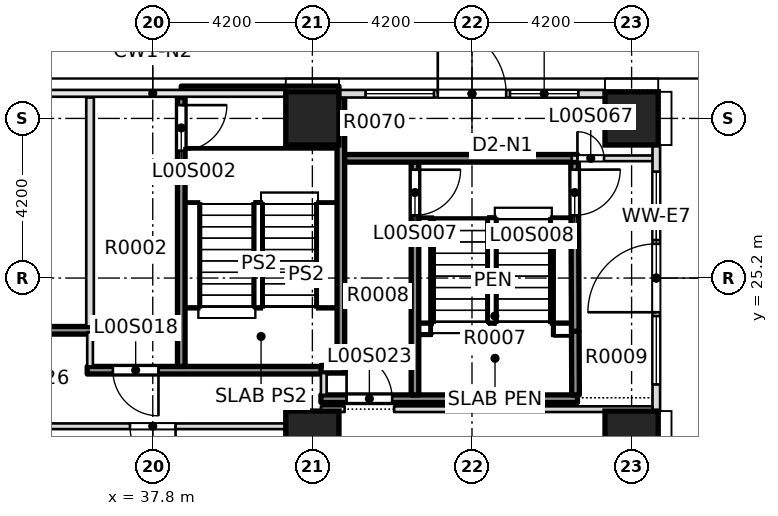
"""IFC4 building model, lengths in metres.
Left out: names, types, materials, properties, quantities, classifications, styles, units other than length and angle.
Written with IfcOpenShell. Run it as: python <this file> out.ifc"""

import sys

from ifc_helpers import new_model, si_unit, direction, frame, frame_2d, origin, origin_2d, place, context, subcontext, project, spatial, rectangle, extrude, element, fill, save


model = new_model("IFC4")
c1 = context("Model", 3, precision=1e-05, world=origin(), true_north=direction((0.0, 1.0)))
c2 = subcontext(c1, "Body", "Model", "MODEL_VIEW")
j1 = project(units=[si_unit("LENGTHUNIT", "METRE"), si_unit("PLANEANGLEUNIT", "RADIAN")], contexts=[c1])
p1 = place(None, origin())
s1 = spatial("IfcSite", under=j1, at=p1, CompositionType="ELEMENT")
p2 = place(p1, origin())
s2 = spatial("IfcBuilding", under=s1, at=p2, CompositionType="ELEMENT")
p3 = place(p2, origin())
s3 = spatial("IfcBuildingStorey", under=s2, at=p3, CompositionType="ELEMENT", Elevation=0.0)
for number, where, z_axis, x_axis in (
    (1, (42.0, 21.0, 0.0), (0.0, 0.0, 1.0), (1.0, 0.0, 0.0)),
    (2, (50.4, 21.0, 0.0), (0.0, 0.0, 1.0), (1.0, 0.0, 0.0)),
    (3, (42.0, 29.4, 0.0), (0.0, 0.0, 1.0), (1.0, 0.0, 0.0)),
    (4, (50.4, 29.4, 0.0), (0.0, 0.0, 1.0), (1.0, 0.0, 0.0)),
):
    element("IfcColumn", number, at=place(p3, frame(where, z_axis=z_axis, x_axis=x_axis)), inside=s3, PredefinedType="COLUMN", context=c2, shape_type="SweptSolid", body=[
        extrude(rectangle(XDim=1.4, YDim=1.4, at=origin_2d()), origin(), (0.0, 0.0, 1.0), 7.5),
    ])
p4 = place(p3, frame((33.525, 21.3, 0.0), z_axis=(0.0, 0.0, 1.0), x_axis=(1.0, 0.0, 0.0)))
e5 = element("IfcWall", 5, at=p4, inside=s3, PredefinedType="PARTITIONING", context=c2, shape_type="SweptSolid", body=[
    extrude(rectangle(XDim=8.85, YDim=0.15, at=frame_2d((4.425, 0.0))), origin(), (0.0, 0.0, 1.0), 7.1),
])
p5 = place(p4, frame((3.675, 0.0, 0.0)))
e6 = element("IfcOpeningElement", 6, at=p5, cuts=e5, PredefinedType="OPENING", context=c2, shape_type="SweptSolid", body=[
    extrude(rectangle(XDim=1.2, YDim=2.1, at=frame_2d((0.6, 1.05))), frame((0.0, 0.085, 0.0), z_axis=(0.0, -1.0, 0.0), x_axis=(1.0, 0.0, 0.0)), (0.0, 0.0, 1.0), 0.17),
])
p6 = place(p3, frame((42.225, 21.75, 0.0), z_axis=(0.0, 0.0, 1.0), x_axis=(1.0, 0.0, 0.0)))
e7 = element("IfcWall", 7, at=p6, inside=s3, PredefinedType="PARTITIONING", context=c2, shape_type="SweptSolid", body=[
    extrude(rectangle(XDim=0.625, YDim=0.15, at=frame_2d((0.312, 0.0))), origin(), (0.0, 0.0, 1.0), 7.1),
])
p7 = place(p3, frame((42.225, 22.025, 0.0), z_axis=(0.0, 0.0, 1.0), x_axis=(1.0, 0.0, 0.0)))
e8 = element("IfcWall", 8, at=p7, inside=s3, PredefinedType="SOLIDWALL", context=c2, shape_type="SweptSolid", body=[
    extrude(rectangle(XDim=6.75, YDim=0.2, at=frame_2d((3.375, 0.0))), origin(), (0.0, 0.0, 1.0), 7.1),
])
p8 = place(p7, frame((0.675, 0.0, 0.0)))
e9 = element("IfcOpeningElement", 9, at=p8, cuts=e8, PredefinedType="OPENING", context=c2, shape_type="SweptSolid", body=[
    extrude(rectangle(XDim=1.2, YDim=2.1, at=frame_2d((0.6, 1.05))), frame((0.0, 0.11, 0.0), z_axis=(0.0, -1.0, 0.0), x_axis=(1.0, 0.0, 0.0)), (0.0, 0.0, 1.0), 0.22),
])
p9 = place(p3, frame((36.075, 22.775, 0.0), z_axis=(0.0, 0.0, 1.0), x_axis=(1.0, 0.0, 0.0)))
e10 = element("IfcWall", 10, at=p9, inside=s3, PredefinedType="SOLIDWALL", context=c2, shape_type="SweptSolid", body=[
    extrude(rectangle(XDim=6.3, YDim=0.2, at=frame_2d((3.15, 0.0))), origin(), (0.0, 0.0, 1.0), 7.1),
])
p10 = place(p9, frame((0.675, 0.0, 0.0)))
e11 = element("IfcOpeningElement", 11, at=p10, cuts=e10, PredefinedType="OPENING", context=c2, shape_type="SweptSolid", body=[
    extrude(rectangle(XDim=1.2, YDim=2.1, at=frame_2d((0.6, 1.05))), frame((0.0, 0.11, 0.0), z_axis=(0.0, -1.0, 0.0), x_axis=(1.0, 0.0, 0.0)), (0.0, 0.0, 1.0), 0.22),
])
p11 = place(p3, frame((42.225, 22.8, 0.0), z_axis=(0.0, 0.0, 1.0), x_axis=(1.0, 0.0, 0.0)))
e12 = element("IfcWall", 12, at=p11, inside=s3, PredefinedType="SOLIDWALL", context=c2, shape_type="SweptSolid", body=[
    extrude(rectangle(XDim=0.625, YDim=0.2, at=frame_2d((0.312, 0.0))), origin(), (0.0, 0.0, 1.0), 7.1),
])
p12 = place(p3, frame((-15.2, 23.825, 0.0), z_axis=(0.0, 0.0, 1.0), x_axis=(1.0, 0.0, 0.0)))
e13 = element("IfcWall", 13, at=p12, inside=s3, PredefinedType="SOLIDWALL", context=c2, shape_type="SweptSolid", body=[
    extrude(rectangle(XDim=51.45, YDim=0.2, at=frame_2d((25.725, 0.0))), origin(), (0.0, 0.0, 1.0), 7.1),
])
p13 = place(p12, frame((17.9, 0.0, 0.0)))
e14 = element("IfcOpeningElement", 14, at=p13, cuts=e13, PredefinedType="OPENING", context=c2, shape_type="SweptSolid", body=[
    extrude(rectangle(XDim=1.2, YDim=2.1, at=frame_2d((0.6, 1.05))), frame((0.0, 0.11, 0.0), z_axis=(0.0, -1.0, 0.0), x_axis=(1.0, 0.0, 0.0)), (0.0, 0.0, 1.0), 0.22),
])
p14 = place(p12, frame((1.7, 0.0, 0.0)))
e15 = element("IfcOpeningElement", 15, at=p14, cuts=e13, PredefinedType="OPENING", context=c2, shape_type="SweptSolid", body=[
    extrude(rectangle(XDim=0.9, YDim=2.1, at=frame_2d((0.45, 1.05))), frame((0.0, 0.11, 0.0), z_axis=(0.0, -1.0, 0.0), x_axis=(1.0, 0.0, 0.0)), (0.0, 0.0, 1.0), 0.22),
])
p15 = place(p12, frame((7.925, 0.0, 0.0)))
e16 = element("IfcOpeningElement", 16, at=p15, cuts=e13, PredefinedType="OPENING", context=c2, shape_type="SweptSolid", body=[
    extrude(rectangle(XDim=1.5, YDim=2.1, at=frame_2d((0.75, 1.05))), frame((0.0, 0.11, 0.0), z_axis=(0.0, -1.0, 0.0), x_axis=(1.0, 0.0, 0.0)), (0.0, 0.0, 1.0), 0.22),
])
p16 = place(p12, frame((24.05, 0.0, 0.0)))
e17 = element("IfcOpeningElement", 17, at=p16, cuts=e13, PredefinedType="OPENING", context=c2, shape_type="SweptSolid", body=[
    extrude(rectangle(XDim=0.9, YDim=2.1, at=frame_2d((0.45, 1.05))), frame((0.0, 0.11, 0.0), z_axis=(0.0, -1.0, 0.0), x_axis=(1.0, 0.0, 0.0)), (0.0, 0.0, 1.0), 0.22),
])
p17 = place(p12, frame((33.05, 0.0, 0.0)))
e18 = element("IfcOpeningElement", 18, at=p17, cuts=e13, PredefinedType="OPENING", context=c2, shape_type="SweptSolid", body=[
    extrude(rectangle(XDim=0.9, YDim=2.1, at=frame_2d((0.45, 1.05))), frame((0.0, 0.11, 0.0), z_axis=(0.0, -1.0, 0.0), x_axis=(1.0, 0.0, 0.0)), (0.0, 0.0, 1.0), 0.22),
])
p18 = place(p12, frame((44.075, 0.0, 0.0)))
e19 = element("IfcOpeningElement", 19, at=p18, cuts=e13, PredefinedType="OPENING", context=c2, shape_type="SweptSolid", body=[
    extrude(rectangle(XDim=0.9, YDim=2.1, at=frame_2d((0.45, 1.05))), frame((0.0, 0.11, 0.0), z_axis=(0.0, -1.0, 0.0), x_axis=(1.0, 0.0, 0.0)), (0.0, 0.0, 1.0), 0.22),
])
p19 = place(p3, frame((48.825, 28.35, 0.0), z_axis=(0.0, 0.0, 1.0), x_axis=(1.0, 0.0, 0.0)))
e20 = element("IfcWall", 20, at=p19, inside=s3, PredefinedType="PARTITIONING", context=c2, shape_type="SweptSolid", body=[
    extrude(rectangle(XDim=2.225, YDim=0.15, at=frame_2d((1.113, 0.0))), origin(), (0.0, 0.0, 1.0), 7.1),
])
p20 = place(p19, frame((0.15, 0.0, 0.0)))
e21 = element("IfcOpeningElement", 21, at=p20, cuts=e20, PredefinedType="OPENING", context=c2, shape_type="SweptSolid", body=[
    extrude(rectangle(XDim=0.7, YDim=2.1, at=frame_2d((0.35, 1.05))), frame((0.0, 0.085, 0.0), z_axis=(0.0, -1.0, 0.0), x_axis=(1.0, 0.0, 0.0)), (0.0, 0.0, 1.0), 0.17),
])
p21 = place(p3, frame((36.15, 22.875, 0.0), z_axis=(0.0, 0.0, 1.0), x_axis=(0.0, 1.0, 0.0)))
e22 = element("IfcWall", 22, at=p21, inside=s3, PredefinedType="PARTITIONING", context=c2, shape_type="SweptSolid", body=[
    extrude(rectangle(XDim=0.9, YDim=0.15, at=frame_2d((0.45, 0.0))), origin(), (0.0, 0.0, 1.0), 7.1),
])
p22 = place(p3, frame((36.15, 23.925, 0.0), z_axis=(0.0, 0.0, 1.0), x_axis=(0.0, 1.0, 0.0)))
e23 = element("IfcWall", 23, at=p22, inside=s3, PredefinedType="PARTITIONING", context=c2, shape_type="SweptSolid", body=[
    extrude(rectangle(XDim=6.025, YDim=0.2, at=frame_2d((3.012, 0.0))), origin(), (0.0, 0.0, 1.0), 7.1),
])
p23 = place(p3, frame((38.55, 22.875, 0.0), z_axis=(0.0, 0.0, 1.0), x_axis=(0.0, 1.0, 0.0)))
e24 = element("IfcWall", 24, at=p23, inside=s3, PredefinedType="SOLIDWALL", context=c2, shape_type="SweptSolid", body=[
    extrude(rectangle(XDim=7.075, YDim=0.2, at=frame_2d((3.538, 0.0))), origin(), (0.0, 0.0, 1.0), 7.1),
])
p24 = place(p23, frame((5.675, 0.0, 0.0)))
e25 = element("IfcOpeningElement", 25, at=p24, cuts=e24, PredefinedType="OPENING", context=c2, shape_type="SweptSolid", body=[
    extrude(rectangle(XDim=1.2, YDim=2.1, at=frame_2d((0.6, 1.05))), frame((0.0, 0.11, 0.0), z_axis=(0.0, -1.0, 0.0), x_axis=(1.0, 0.0, 0.0)), (0.0, 0.0, 1.0), 0.22),
])
p25 = place(p3, frame((42.0, 12.7, 0.0), z_axis=(0.0, 0.0, 1.0), x_axis=(0.0, 1.0, 0.0)))
e26 = element("IfcWall", 26, at=p25, inside=s3, PredefinedType="PARTITIONING", context=c2, shape_type="SweptSolid", body=[
    extrude(rectangle(XDim=8.525, YDim=0.2, at=frame_2d((4.263, 0.0))), origin(), (0.0, 0.0, 1.0), 7.1),
])
p26 = place(p25, frame((3.812, 0.0, 0.0)))
e27 = element("IfcOpeningElement", 27, at=p26, cuts=e26, PredefinedType="OPENING", context=c2, shape_type="SweptSolid", body=[
    extrude(rectangle(XDim=0.9, YDim=2.1, at=frame_2d((0.45, 1.05))), frame((0.0, 0.11, 0.0), z_axis=(0.0, -1.0, 0.0), x_axis=(1.0, 0.0, 0.0)), (0.0, 0.0, 1.0), 0.22),
])
p27 = place(p3, frame((42.3, 21.375, 0.0), z_axis=(0.0, 0.0, 1.0), x_axis=(0.0, 1.0, 0.0)))
e28 = element("IfcWall", 28, at=p27, inside=s3, PredefinedType="PARTITIONING", context=c2, shape_type="SweptSolid", body=[
    extrude(rectangle(XDim=0.3, YDim=0.15, at=frame_2d((0.15, 0.0))), origin(), (0.0, 0.0, 1.0), 7.1),
])
p28 = place(p3, frame((42.3, 22.125, 0.0), z_axis=(0.0, 0.0, 1.0), x_axis=(0.0, 1.0, 0.0)))
e29 = element("IfcWall", 29, at=p28, inside=s3, PredefinedType="PARTITIONING", context=c2, shape_type="SweptSolid", body=[
    extrude(rectangle(XDim=0.575, YDim=0.15, at=frame_2d((0.288, 0.0))), origin(), (0.0, 0.0, 1.0), 7.1),
])
p29 = place(p3, frame((42.75, 22.9, 0.0), z_axis=(0.0, 0.0, 1.0), x_axis=(0.0, 1.0, 0.0)))
e30 = element("IfcWall", 30, at=p29, inside=s3, PredefinedType="SOLIDWALL", context=c2, shape_type="SweptSolid", body=[
    extrude(rectangle(XDim=7.05, YDim=0.2, at=frame_2d((3.525, 0.0))), origin(), (0.0, 0.0, 1.0), 7.1),
])
p30 = place(p3, frame((44.7, 22.125, 0.0), z_axis=(0.0, 0.0, 1.0), x_axis=(0.0, 1.0, 0.0)))
e31 = element("IfcWall", 31, at=p30, inside=s3, PredefinedType="SOLIDWALL", context=c2, shape_type="SweptSolid", body=[
    extrude(rectangle(XDim=6.125, YDim=0.2, at=frame_2d((3.062, 0.0))), origin(), (0.0, 0.0, 1.0), 7.1),
])
p31 = place(p30, frame((4.725, 0.0, 0.0)))
e32 = element("IfcOpeningElement", 32, at=p31, cuts=e31, PredefinedType="OPENING", context=c2, shape_type="SweptSolid", body=[
    extrude(rectangle(XDim=1.2, YDim=2.1, at=frame_2d((0.6, 1.05))), frame((0.0, 0.11, 0.0), z_axis=(0.0, -1.0, 0.0), x_axis=(1.0, 0.0, 0.0)), (0.0, 0.0, 1.0), 0.22),
])
p32 = place(p3, frame((48.925, 22.125, 0.0), z_axis=(0.0, 0.0, 1.0), x_axis=(-0.003935829573, 0.999992254593, 0.0)))
e33 = element("IfcWall", 33, at=p32, inside=s3, PredefinedType="SOLIDWALL", context=c2, shape_type="SweptSolid", body=[
    extrude(rectangle(XDim=1.675, YDim=0.2, at=frame_2d((0.837, 0.0))), origin(), (0.0, 0.0, 1.0), 7.1),
])
p33 = place(p3, frame((51.05, 28.7, 0.0), z_axis=(0.0, 0.0, 1.0), x_axis=(0.0, -1.0, 0.0)))
e34 = element("IfcWall", 34, at=p33, inside=s3, PredefinedType="STANDARD", context=c2, shape_type="SweptSolid", body=[
    extrude(rectangle(XDim=7.0, YDim=0.2, at=frame_2d((3.5, 0.0))), origin(), (0.0, 0.0, 1.0), 7.1),
])
p34 = place(p33, frame((4.5, 0.0, 0.3)))
e35 = element("IfcOpeningElement", 35, at=p34, cuts=e34, PredefinedType="OPENING", context=c2, shape_type="SweptSolid", body=[
    extrude(rectangle(XDim=1.8, YDim=4.2, at=frame_2d((0.9, 2.1))), frame((0.0, 0.11, 0.0), z_axis=(0.0, -1.0, 0.0), x_axis=(1.0, 0.0, 0.0)), (0.0, 0.0, 1.0), 0.22),
])
p35 = place(p33, frame((2.6, 0.0, 0.0)))
e36 = element("IfcOpeningElement", 36, at=p35, cuts=e34, PredefinedType="OPENING", context=c2, shape_type="SweptSolid", body=[
    extrude(rectangle(XDim=1.8, YDim=2.4, at=frame_2d((0.9, 1.2))), frame((0.0, 0.11, 0.0), z_axis=(0.0, -1.0, 0.0), x_axis=(1.0, 0.0, 0.0)), (0.0, 0.0, 1.0), 0.22),
])
p36 = place(p33, frame((0.7, 0.0, 0.3)))
e37 = element("IfcOpeningElement", 37, at=p36, cuts=e34, PredefinedType="OPENING", context=c2, shape_type="SweptSolid", body=[
    extrude(rectangle(XDim=1.8, YDim=4.2, at=frame_2d((0.9, 2.1))), frame((0.0, 0.11, 0.0), z_axis=(0.0, -1.0, 0.0), x_axis=(1.0, 0.0, 0.0)), (0.0, 0.0, 1.0), 0.22),
])
p37 = place(p3, frame((42.7, 30.05, 0.0), z_axis=(0.0, 0.0, 1.0), x_axis=(1.0, 0.0, 0.0)))
e38 = element("IfcWall", 38, at=p37, inside=s3, PredefinedType="STANDARD", context=c2, shape_type="SweptSolid", body=[
    extrude(rectangle(XDim=7.0, YDim=0.2, at=frame_2d((3.5, 0.0))), origin(), (0.0, 0.0, 1.0), 7.1),
])
p38 = place(p37, frame((4.5, 0.0, 0.3)))
e39 = element("IfcOpeningElement", 39, at=p38, cuts=e38, PredefinedType="OPENING", context=c2, shape_type="SweptSolid", body=[
    extrude(rectangle(XDim=1.8, YDim=4.2, at=frame_2d((0.9, 2.1))), frame((0.0, 0.11, 0.0), z_axis=(0.0, -1.0, 0.0), x_axis=(1.0, 0.0, 0.0)), (0.0, 0.0, 1.0), 0.22),
])
p39 = place(p37, frame((2.6, 0.0, 0.0)))
e40 = element("IfcOpeningElement", 40, at=p39, cuts=e38, PredefinedType="OPENING", context=c2, shape_type="SweptSolid", body=[
    extrude(rectangle(XDim=1.8, YDim=2.4, at=frame_2d((0.9, 1.2))), frame((0.0, 0.11, 0.0), z_axis=(0.0, -1.0, 0.0), x_axis=(1.0, 0.0, 0.0)), (0.0, 0.0, 1.0), 0.22),
])
p40 = place(p37, frame((0.7, 0.0, 0.3)))
e41 = element("IfcOpeningElement", 41, at=p40, cuts=e38, PredefinedType="OPENING", context=c2, shape_type="SweptSolid", body=[
    extrude(rectangle(XDim=1.8, YDim=4.2, at=frame_2d((0.9, 2.1))), frame((0.0, 0.11, 0.0), z_axis=(0.0, -1.0, 0.0), x_axis=(1.0, 0.0, 0.0)), (0.0, 0.0, 1.0), 0.22),
])
p41 = place(p3, frame((38.55, 30.15, 0.0), z_axis=(0.0, 0.0, 1.0), x_axis=(1.0, 0.0, 0.0)))
e42 = element("IfcWall", 42, at=p41, inside=s3, PredefinedType="SOLIDWALL", context=c2, shape_type="SweptSolid", body=[
    extrude(rectangle(XDim=4.15, YDim=0.2, at=frame_2d((2.075, 0.0))), origin(), (0.0, 0.0, 1.0), 7.1),
])
p42 = place(p3, frame((48.918, 23.8, 0.0), z_axis=(0.0, 0.0, 1.0), x_axis=(-0.004091618778, 0.999991629293, 0.0)))
e43 = element("IfcWall", 43, at=p42, inside=s3, PredefinedType="SOLIDWALL", context=c2, shape_type="SweptSolid", body=[
    extrude(rectangle(XDim=4.475, YDim=0.2, at=frame_2d((2.238, 0.0))), origin(), (0.0, 0.0, 1.0), 7.1),
])
p43 = place(p42, frame((3.05, 0.0, 0.0)))
e44 = element("IfcOpeningElement", 44, at=p43, cuts=e43, PredefinedType="OPENING", context=c2, shape_type="SweptSolid", body=[
    extrude(rectangle(XDim=1.2, YDim=2.1, at=frame_2d((0.6, 1.05))), frame((0.0, 0.11, 0.0), z_axis=(0.0, -1.0, 0.0), x_axis=(1.0, 0.0, 0.0)), (0.0, 0.0, 1.0), 0.22),
])
p44 = place(p3, frame((42.85, 28.35, 0.0), z_axis=(0.0, 0.0, 1.0), x_axis=(1.0, 0.0, 0.0)))
e45 = element("IfcWall", 45, at=p44, inside=s3, PredefinedType="SOLIDWALL", context=c2, shape_type="SweptSolid", body=[
    extrude(rectangle(XDim=6.125, YDim=0.2, at=frame_2d((3.062, 0.0))), origin(), (0.0, 0.0, 1.0), 7.1),
])
p45 = place(p3, frame((44.15, 21.75, 0.0), z_axis=(0.0, 0.0, 1.0), x_axis=(1.0, 0.0, 0.0)))
e46 = element("IfcWall", 46, at=p45, inside=s3, PredefinedType="PARTITIONING", context=c2, shape_type="SweptSolid", body=[
    extrude(rectangle(XDim=6.8, YDim=0.15, at=frame_2d((3.4, 0.0))), origin(), (0.0, 0.0, 1.0), 7.1),
])
p46 = place(p24, origin())
e47 = element("IfcDoor", 47, at=p46, inside=s3, OperationType="DOUBLE_DOOR_SINGLE_SWING", PredefinedType="DOOR", context=c2, shape_type="SweptSolid", body=[
    extrude(rectangle(XDim=1.2, YDim=2.1, at=frame_2d((0.6, 1.05))), frame((0.0, 0.025, 0.0), z_axis=(0.0, -1.0, 0.0), x_axis=(1.0, 0.0, 0.0)), (0.0, 0.0, 1.0), 0.05),
])
fill(e25, e47)
p47 = place(p31, origin())
e48 = element("IfcDoor", 48, at=p47, inside=s3, OperationType="DOUBLE_DOOR_SINGLE_SWING", PredefinedType="DOOR", context=c2, shape_type="SweptSolid", body=[
    extrude(rectangle(XDim=1.2, YDim=2.1, at=frame_2d((0.6, 1.05))), frame((0.0, 0.025, 0.0), z_axis=(0.0, -1.0, 0.0), x_axis=(1.0, 0.0, 0.0)), (0.0, 0.0, 1.0), 0.05),
])
fill(e32, e48)
p48 = place(p43, origin())
e49 = element("IfcDoor", 49, at=p48, inside=s3, OperationType="DOUBLE_DOOR_SINGLE_SWING", PredefinedType="DOOR", context=c2, shape_type="SweptSolid", body=[
    extrude(rectangle(XDim=1.2, YDim=2.1, at=frame_2d((0.6, 1.05))), frame((0.0, 0.025, 0.0), z_axis=(0.0, -1.0, 0.0), x_axis=(1.0, 0.0, 0.0)), (0.0, 0.0, 1.0), 0.05),
])
fill(e44, e49)
p49 = place(p10, origin())
e50 = element("IfcDoor", 50, at=p49, inside=s3, OperationType="SINGLE_SWING_LEFT", PredefinedType="DOOR", context=c2, shape_type="SweptSolid", body=[
    extrude(rectangle(XDim=1.2, YDim=2.1, at=frame_2d((0.6, 1.05))), frame((0.0, 0.025, 0.0), z_axis=(0.0, -1.0, 0.0), x_axis=(1.0, 0.0, 0.0)), (0.0, 0.0, 1.0), 0.05),
])
fill(e11, e50)
p50 = place(p8, origin())
e51 = element("IfcDoor", 51, at=p50, inside=s3, OperationType="SINGLE_SWING_LEFT", PredefinedType="DOOR", context=c2, shape_type="SweptSolid", body=[
    extrude(rectangle(XDim=1.2, YDim=2.1, at=frame_2d((0.6, 1.05))), frame((0.0, 0.025, 0.0), z_axis=(0.0, -1.0, 0.0), x_axis=(1.0, 0.0, 0.0)), (0.0, 0.0, 1.0), 0.05),
])
fill(e9, e51)
p51 = place(p5, origin())
e52 = element("IfcDoor", 52, at=p51, inside=s3, OperationType="SINGLE_SWING_RIGHT", PredefinedType="DOOR", context=c2, shape_type="SweptSolid", body=[
    extrude(rectangle(XDim=1.2, YDim=2.1, at=frame_2d((0.6, 1.05))), frame((0.0, 0.025, 0.0), z_axis=(0.0, -1.0, 0.0), x_axis=(1.0, 0.0, 0.0)), (0.0, 0.0, 1.0), 0.05),
])
fill(e6, e52)
p52 = place(p20, origin())
e53 = element("IfcDoor", 53, at=p52, inside=s3, OperationType="SINGLE_SWING_RIGHT", PredefinedType="DOOR", context=c2, shape_type="SweptSolid", body=[
    extrude(rectangle(XDim=0.7, YDim=2.1, at=frame_2d((0.35, 1.05))), frame((0.0, 0.025, 0.0), z_axis=(0.0, -1.0, 0.0), x_axis=(1.0, 0.0, 0.0)), (0.0, 0.0, 1.0), 0.05),
])
fill(e21, e53)
p53 = place(p34, origin())
e54 = element("IfcWindow", 54, at=p53, inside=s3, PartitioningType="SINGLE_PANEL", PredefinedType="WINDOW", context=c2, shape_type="SweptSolid", body=[
    extrude(rectangle(XDim=1.8, YDim=4.2, at=frame_2d((0.9, 2.1))), frame((0.0, 0.03, 0.0), z_axis=(0.0, -1.0, 0.0), x_axis=(1.0, 0.0, 0.0)), (0.0, 0.0, 1.0), 0.06),
])
fill(e35, e54)
p54 = place(p35, origin())
e55 = element("IfcDoor", 55, at=p54, inside=s3, OperationType="SINGLE_SWING_LEFT", PredefinedType="DOOR", context=c2, shape_type="SweptSolid", body=[
    extrude(rectangle(XDim=1.8, YDim=2.4, at=frame_2d((0.9, 1.2))), frame((0.0, 0.025, 0.0), z_axis=(0.0, -1.0, 0.0), x_axis=(1.0, 0.0, 0.0)), (0.0, 0.0, 1.0), 0.05),
])
fill(e36, e55)
p55 = place(p36, origin())
e56 = element("IfcWindow", 56, at=p55, inside=s3, PartitioningType="SINGLE_PANEL", PredefinedType="WINDOW", context=c2, shape_type="SweptSolid", body=[
    extrude(rectangle(XDim=1.8, YDim=4.2, at=frame_2d((0.9, 2.1))), frame((0.0, 0.03, 0.0), z_axis=(0.0, -1.0, 0.0), x_axis=(1.0, 0.0, 0.0)), (0.0, 0.0, 1.0), 0.06),
])
fill(e37, e56)
p56 = place(p38, origin())
e57 = element("IfcWindow", 57, at=p56, inside=s3, PartitioningType="SINGLE_PANEL", PredefinedType="WINDOW", context=c2, shape_type="SweptSolid", body=[
    extrude(rectangle(XDim=1.8, YDim=4.2, at=frame_2d((0.9, 2.1))), frame((0.0, 0.03, 0.0), z_axis=(0.0, -1.0, 0.0), x_axis=(1.0, 0.0, 0.0)), (0.0, 0.0, 1.0), 0.06),
])
fill(e39, e57)
p57 = place(p39, origin())
e58 = element("IfcDoor", 58, at=p57, inside=s3, OperationType="SINGLE_SWING_LEFT", PredefinedType="DOOR", context=c2, shape_type="SweptSolid", body=[
    extrude(rectangle(XDim=1.8, YDim=2.4, at=frame_2d((0.9, 1.2))), frame((0.0, 0.025, 0.0), z_axis=(0.0, -1.0, 0.0), x_axis=(1.0, 0.0, 0.0)), (0.0, 0.0, 1.0), 0.05),
])
fill(e40, e58)
p58 = place(p40, origin())
e59 = element("IfcWindow", 59, at=p58, inside=s3, PartitioningType="SINGLE_PANEL", PredefinedType="WINDOW", context=c2, shape_type="SweptSolid", body=[
    extrude(rectangle(XDim=1.8, YDim=4.2, at=frame_2d((0.9, 2.1))), frame((0.0, 0.03, 0.0), z_axis=(0.0, -1.0, 0.0), x_axis=(1.0, 0.0, 0.0)), (0.0, 0.0, 1.0), 0.06),
])
fill(e41, e59)
save(model, sys.argv[1])
